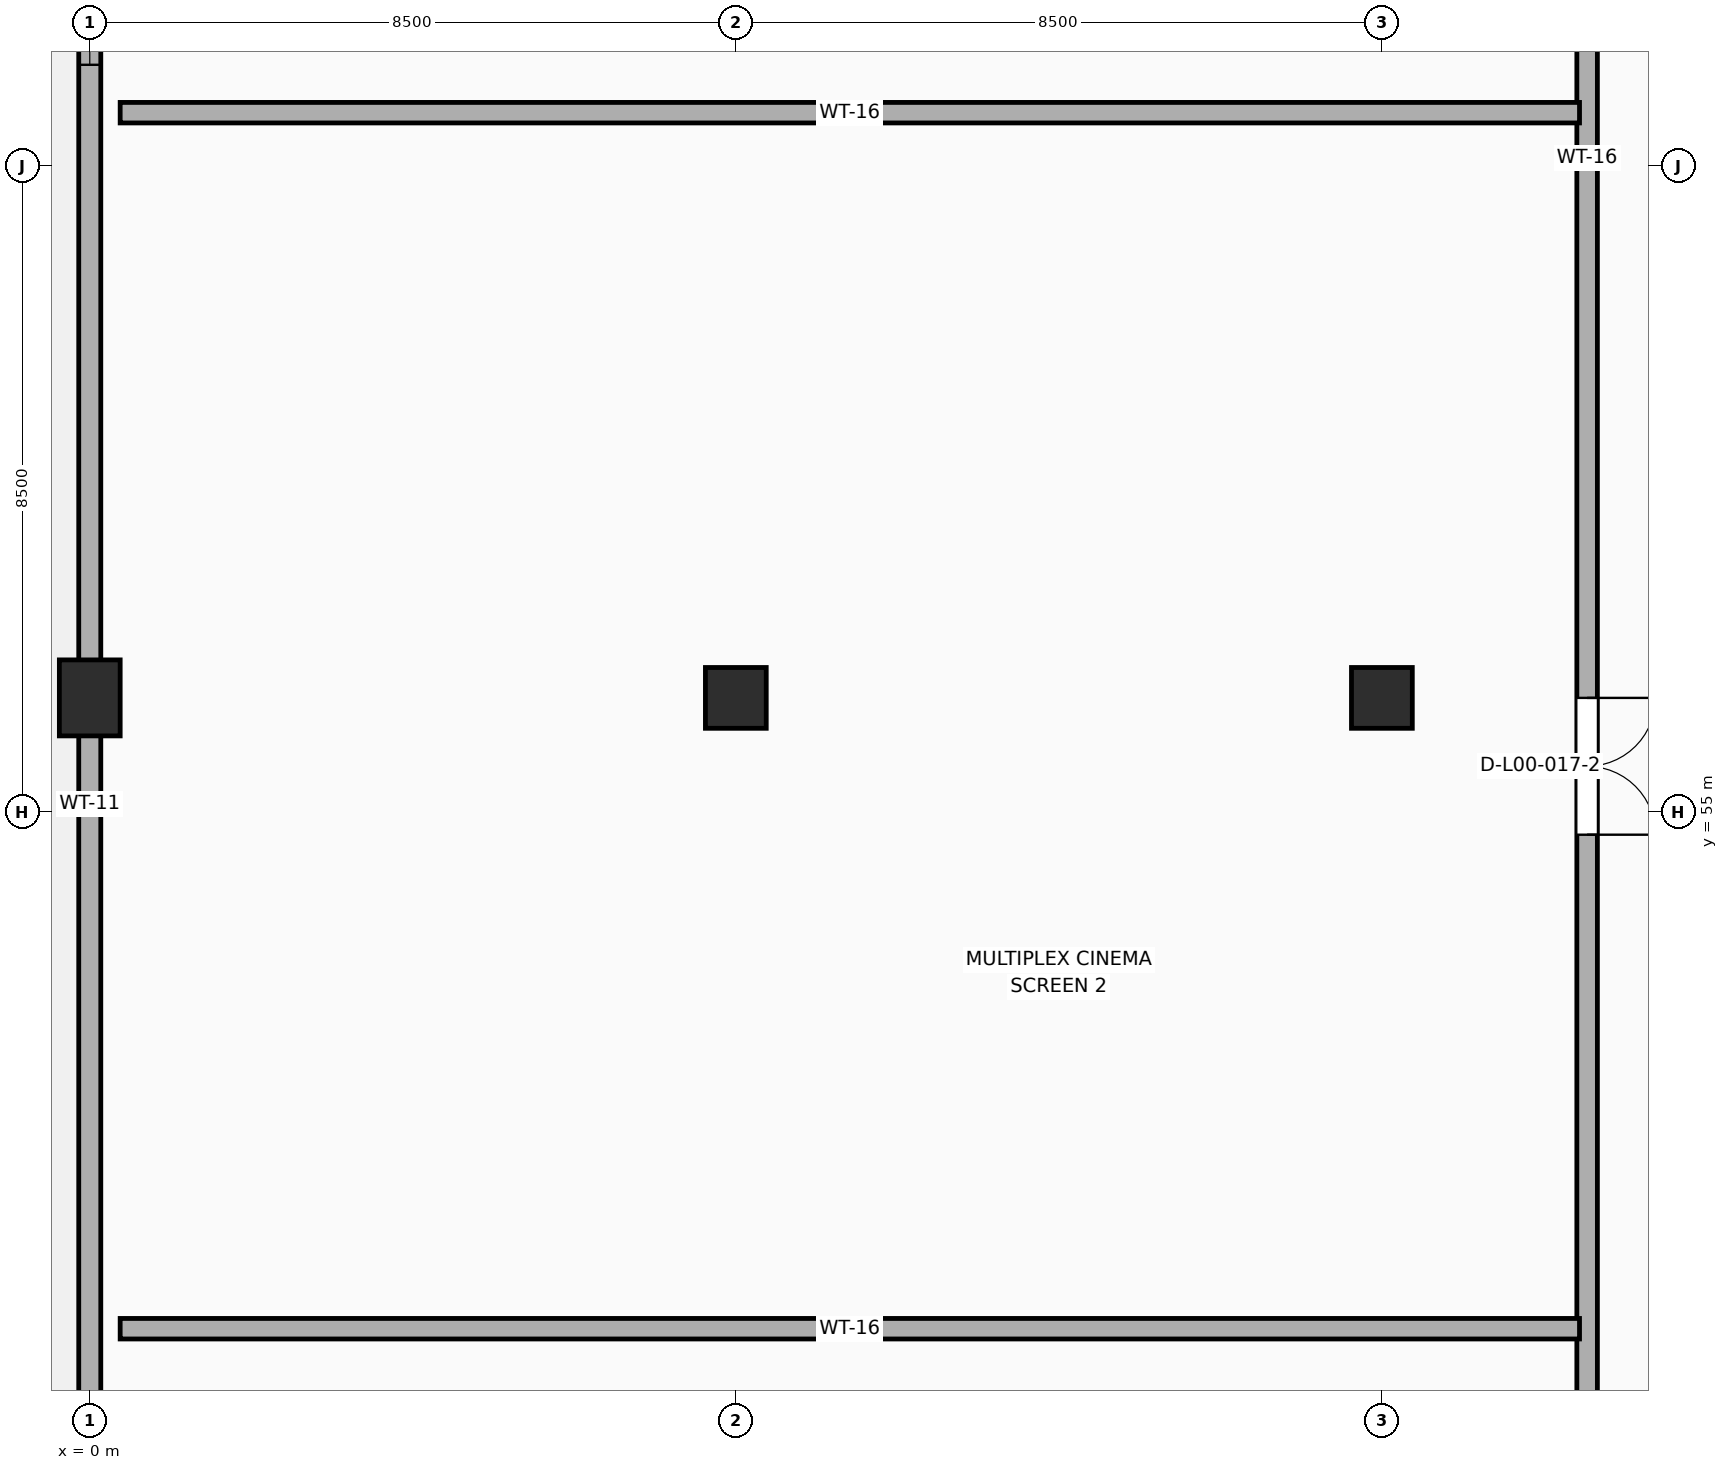
"""IFC4 building model, lengths in metres.
Left out: names, types, materials, properties, quantities, classifications, styles, units other than length and angle.
Written with IfcOpenShell. Run it as: python <this file> out.ifc"""

import sys

from ifc_helpers import new_model, si_unit, direction, frame, frame_2d, origin, origin_2d, place, context, subcontext, project, spatial, rectangle, extrude, element, fill, save


model = new_model("IFC4")
c1 = context("Model", 3, precision=1e-05, world=origin(), true_north=direction((0.0, 1.0)))
c2 = subcontext(c1, "Body", "Model", "MODEL_VIEW")
j1 = project(units=[si_unit("LENGTHUNIT", "METRE"), si_unit("PLANEANGLEUNIT", "RADIAN")], contexts=[c1])
p1 = place(None, origin())
s1 = spatial("IfcSite", under=j1, at=p1, CompositionType="ELEMENT")
p2 = place(p1, origin())
s2 = spatial("IfcBuilding", under=s1, at=p2, CompositionType="ELEMENT")
p3 = place(p2, origin())
s3 = spatial("IfcBuildingStorey", under=s2, at=p3, CompositionType="ELEMENT", Elevation=0.0)
p4 = place(p3, frame((0.0, 56.5, 0.0), z_axis=(0.0, 0.0, 1.0), x_axis=(1.0, 0.0, 0.0)))
e1 = element("IfcColumn", 1, at=p4, inside=s3, PredefinedType="COLUMN", context=c2, shape_type="SweptSolid", body=[
    extrude(rectangle(XDim=0.8, YDim=1.0, at=origin_2d()), origin(), (0.0, 0.0, 1.0), 5.14),
])
for number, where, z_axis, x_axis in (
    (2, (8.5, 56.5, 0.0), (0.0, 0.0, 1.0), (1.0, 0.0, 0.0)),
    (3, (17.0, 56.5, 0.0), (0.0, 0.0, 1.0), (1.0, 0.0, 0.0)),
):
    element("IfcColumn", number, at=place(p3, frame(where, z_axis=z_axis, x_axis=x_axis)), inside=s3, PredefinedType="COLUMN", context=c2, shape_type="SweptSolid", body=[
        extrude(rectangle(XDim=0.8, YDim=0.8, at=origin_2d()), origin(), (0.0, 0.0, 1.0), 5.14),
    ])
p5 = place(p3, frame((0.0, 32.0, 0.0), z_axis=(0.0, 0.0, 1.0), x_axis=(0.0, 1.0, 0.0)))
e4 = element("IfcWall", 4, at=p5, inside=s3, PredefinedType="STANDARD", context=c2, shape_type="SweptSolid", body=[
    extrude(rectangle(XDim=48.5, YDim=0.29, at=frame_2d((24.25, 0.0))), origin(), (0.0, 0.0, 1.0), 4.28),
])
p6 = place(p5, frame((6.2, 0.0, 0.0)))
e5 = element("IfcOpeningElement", 5, at=p6, cuts=e4, PredefinedType="OPENING", context=c2, shape_type="SweptSolid", body=[
    extrude(rectangle(XDim=1.8, YDim=2.3, at=frame_2d((0.9, 1.15))), frame((0.0, 0.157, 0.0), z_axis=(0.0, -1.0, 0.0), x_axis=(1.0, 0.0, 0.0)), (0.0, 0.0, 1.0), 0.314),
])
p7 = place(p5, frame((38.2, 0.0, 0.0)))
e6 = element("IfcOpeningElement", 6, at=p7, cuts=e4, PredefinedType="OPENING", context=c2, shape_type="SweptSolid", body=[
    extrude(rectangle(XDim=1.8, YDim=2.3, at=frame_2d((0.9, 1.15))), frame((0.0, 0.157, 0.0), z_axis=(0.0, -1.0, 0.0), x_axis=(1.0, 0.0, 0.0)), (0.0, 0.0, 1.0), 0.314),
])
p8 = place(p5, frame((32.83, 0.0, 2.72)))
e7 = element("IfcOpeningElement", 7, at=p8, cuts=e4, PredefinedType="OPENING", context=c2, shape_type="SweptSolid", body=[
    extrude(rectangle(XDim=3.0, YDim=1.4, at=frame_2d((1.5, 0.7))), frame((0.0, 0.157, 0.0), z_axis=(0.0, -1.0, 0.0), x_axis=(1.0, 0.0, 0.0)), (0.0, 0.0, 1.0), 0.314),
])
p9 = place(p5, frame((42.15, 0.0, 2.72)))
e8 = element("IfcOpeningElement", 8, at=p9, cuts=e4, PredefinedType="OPENING", context=c2, shape_type="SweptSolid", body=[
    extrude(rectangle(XDim=3.0, YDim=1.4, at=frame_2d((1.5, 0.7))), frame((0.0, 0.157, 0.0), z_axis=(0.0, -1.0, 0.0), x_axis=(1.0, 0.0, 0.0)), (0.0, 0.0, 1.0), 0.314),
])
p10 = place(p3, frame((19.7, 32.2, 0.0), z_axis=(0.0, 0.0, 1.0), x_axis=(0.0, 1.0, 0.0)))
e9 = element("IfcWall", 9, at=p10, inside=s3, PredefinedType="PARTITIONING", context=c2, shape_type="SweptSolid", body=[
    extrude(rectangle(XDim=48.0, YDim=0.27, at=frame_2d((24.0, 0.0))), origin(), (0.0, 0.0, 1.0), 4.23),
])
p11 = place(p10, frame((6.5, 0.0, 0.0)))
e10 = element("IfcOpeningElement", 10, at=p11, cuts=e9, PredefinedType="OPENING", context=c2, shape_type="SweptSolid", body=[
    extrude(rectangle(XDim=1.8, YDim=2.4, at=frame_2d((0.9, 1.2))), frame((0.0, 0.147, 0.0), z_axis=(0.0, -1.0, 0.0), x_axis=(1.0, 0.0, 0.0)), (0.0, 0.0, 1.0), 0.294),
])
p12 = place(p10, frame((22.5, 0.0, 0.0)))
e11 = element("IfcOpeningElement", 11, at=p12, cuts=e9, PredefinedType="OPENING", context=c2, shape_type="SweptSolid", body=[
    extrude(rectangle(XDim=1.8, YDim=2.4, at=frame_2d((0.9, 1.2))), frame((0.0, 0.147, 0.0), z_axis=(0.0, -1.0, 0.0), x_axis=(1.0, 0.0, 0.0)), (0.0, 0.0, 1.0), 0.294),
])
p13 = place(p10, frame((38.5, 0.0, 0.0)))
e12 = element("IfcOpeningElement", 12, at=p13, cuts=e9, PredefinedType="OPENING", context=c2, shape_type="SweptSolid", body=[
    extrude(rectangle(XDim=1.8, YDim=2.4, at=frame_2d((0.9, 1.2))), frame((0.0, 0.147, 0.0), z_axis=(0.0, -1.0, 0.0), x_axis=(1.0, 0.0, 0.0)), (0.0, 0.0, 1.0), 0.294),
])
p14 = place(p3, frame((0.4, 48.2, 0.0), z_axis=(0.0, 0.0, 1.0), x_axis=(1.0, 0.0, 0.0)))
e13 = element("IfcWall", 13, at=p14, inside=s3, PredefinedType="PARTITIONING", context=c2, shape_type="SweptSolid", body=[
    extrude(rectangle(XDim=19.2, YDim=0.27, at=frame_2d((9.6, 0.0))), origin(), (0.0, 0.0, 1.0), 4.33),
])
p15 = place(p3, frame((0.4, 64.2, 0.0), z_axis=(0.0, 0.0, 1.0), x_axis=(1.0, 0.0, 0.0)))
e14 = element("IfcWall", 14, at=p15, inside=s3, PredefinedType="PARTITIONING", context=c2, shape_type="SweptSolid", body=[
    extrude(rectangle(XDim=19.2, YDim=0.27, at=frame_2d((9.6, 0.0))), origin(), (0.0, 0.0, 1.0), 4.28),
])
p16 = place(p8, origin())
e15 = element("IfcWindow", 15, at=p16, inside=s3, PartitioningType="SINGLE_PANEL", PredefinedType="WINDOW", context=c2, shape_type="SweptSolid", body=[
    extrude(rectangle(XDim=3.0, YDim=1.4, at=frame_2d((1.5, 0.7))), frame((0.0, 0.03, 0.0), z_axis=(0.0, -1.0, 0.0), x_axis=(1.0, 0.0, 0.0)), (0.0, 0.0, 1.0), 0.06),
])
fill(e7, e15)
p17 = place(p12, frame((1.8, 0.0, 0.0), z_axis=(0.0, 0.0, 1.0), x_axis=(-1.0, 0.0, 0.0)))
e16 = element("IfcDoor", 16, at=p17, inside=s3, OperationType="DOUBLE_DOOR_SINGLE_SWING", PredefinedType="DOOR", context=c2, shape_type="SweptSolid", body=[
    extrude(rectangle(XDim=1.8, YDim=2.4, at=frame_2d((0.9, 1.2))), frame((0.0, 0.025, 0.0), z_axis=(0.0, -1.0, 0.0), x_axis=(1.0, 0.0, 0.0)), (0.0, 0.0, 1.0), 0.05),
])
fill(e11, e16)
save(model, sys.argv[1])
